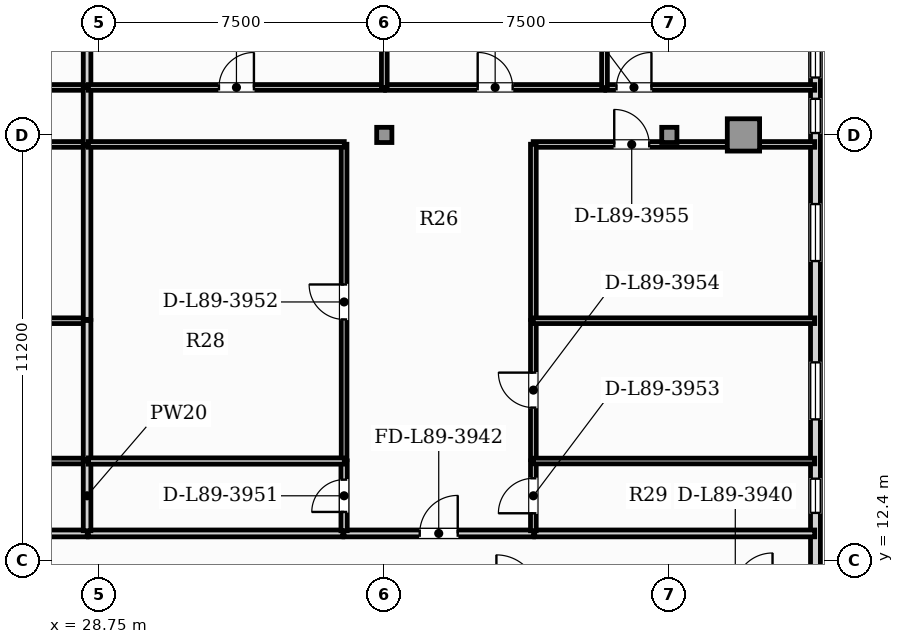
"""IFC4 building model, lengths in metres.
Left out: names, types, materials, properties, quantities, classifications, styles, units other than length and angle.
Written with IfcOpenShell. Run it as: python <this file> out.ifc"""

import sys

from ifc_helpers import new_model, si_unit, direction, frame, frame_2d, origin, origin_2d, place, context, subcontext, project, spatial, rectangle, hollow_rectangle, extrude, element, fill, save


model = new_model("IFC4")
c1 = context("Model", 3, precision=1e-05, world=origin(), true_north=direction((0.0, 1.0)))
c2 = subcontext(c1, "Body", "Model", "MODEL_VIEW")
j1 = project(units=[si_unit("LENGTHUNIT", "METRE"), si_unit("PLANEANGLEUNIT", "RADIAN")], contexts=[c1])
p1 = place(None, origin())
s1 = spatial("IfcSite", under=j1, at=p1, CompositionType="ELEMENT")
p2 = place(p1, origin())
s2 = spatial("IfcBuilding", under=s1, at=p2, CompositionType="ELEMENT")
p3 = place(p2, frame((0.0, 0.0, 362.25)))
s3 = spatial("IfcBuildingStorey", under=s2, at=p3, CompositionType="ELEMENT", Elevation=362.25)
p4 = place(p3, frame((45.7, 23.6, 0.0), z_axis=(0.0, 0.0, 1.0), x_axis=(1.0, 0.0, 0.0)))
e1 = element("IfcColumn", 1, at=p4, inside=s3, PredefinedType="USERDEFINED", context=c2, shape_type="SweptSolid", body=[
    extrude(hollow_rectangle(XDim=0.85, YDim=0.85, WallThickness=0.05, at=origin_2d()), origin(), (0.0, 0.0, 1.0), 4.35),
])
for number, where, z_axis, x_axis in (
    (2, (36.25, 23.6, 0.0), (0.0, 0.0, 1.0), (1.0, 0.0, 0.0)),
    (3, (43.75, 23.6, 0.0), (0.0, 0.0, 1.0), (1.0, 0.0, 0.0)),
):
    element("IfcColumn", number, at=place(p3, frame(where, z_axis=z_axis, x_axis=x_axis)), inside=s3, PredefinedType="COLUMN", context=c2, shape_type="SweptSolid", body=[
        extrude(hollow_rectangle(XDim=0.4, YDim=0.4, WallThickness=0.02, at=origin_2d()), origin(), (0.0, 0.0, 1.0), 4.35),
    ])
p5 = place(p3, frame((47.595, 3.24, 0.0), z_axis=(0.0, 0.0, 1.0), x_axis=(0.0, 1.0, 0.0)))
e4 = element("IfcWall", 4, at=p5, inside=s3, PredefinedType="SOLIDWALL", context=c2, shape_type="SweptSolid", body=[
    extrude(rectangle(XDim=24.14, YDim=0.26, at=frame_2d((12.07, 0.0))), origin(), (0.0, 0.0, 1.0), 4.1),
])
p6 = place(p5, frame((0.77, 0.0, 0.9)))
e5 = element("IfcOpeningElement", 5, at=p6, cuts=e4, PredefinedType="OPENING", context=c2, shape_type="SweptSolid", body=[
    extrude(rectangle(XDim=1.5, YDim=1.95, at=frame_2d((0.75, 0.975))), frame((0.0, 0.14, 0.0), z_axis=(0.0, -1.0, 0.0), x_axis=(1.0, 0.0, 0.0)), (0.0, 0.0, 1.0), 0.28),
])
p7 = place(p5, frame((20.41, 0.0, 0.95)))
e6 = element("IfcOpeningElement", 6, at=p7, cuts=e4, PredefinedType="OPENING", context=c2, shape_type="SweptSolid", body=[
    extrude(rectangle(XDim=0.9, YDim=1.5, at=frame_2d((0.45, 0.75))), frame((0.0, 0.14, 0.0), z_axis=(0.0, -1.0, 0.0), x_axis=(1.0, 0.0, 0.0)), (0.0, 0.0, 1.0), 0.28),
])
p8 = place(p5, frame((10.415, 0.0, 0.95)))
e7 = element("IfcOpeningElement", 7, at=p8, cuts=e4, PredefinedType="OPENING", context=c2, shape_type="SweptSolid", body=[
    extrude(rectangle(XDim=0.9, YDim=1.5, at=frame_2d((0.45, 0.75))), frame((0.0, 0.14, 0.0), z_axis=(0.0, -1.0, 0.0), x_axis=(1.0, 0.0, 0.0)), (0.0, 0.0, 1.0), 0.28),
])
p9 = place(p5, frame((12.876, 0.0, 0.9)))
e8 = element("IfcOpeningElement", 8, at=p9, cuts=e4, PredefinedType="OPENING", context=c2, shape_type="SweptSolid", body=[
    extrude(rectangle(XDim=1.5, YDim=1.95, at=frame_2d((0.75, 0.975))), frame((0.0, 0.14, 0.0), z_axis=(0.0, -1.0, 0.0), x_axis=(1.0, 0.0, 0.0)), (0.0, 0.0, 1.0), 0.28),
])
p10 = place(p5, frame((17.041, 0.0, 0.9)))
e9 = element("IfcOpeningElement", 9, at=p10, cuts=e4, PredefinedType="OPENING", context=c2, shape_type="SweptSolid", body=[
    extrude(rectangle(XDim=1.5, YDim=1.95, at=frame_2d((0.75, 0.975))), frame((0.0, 0.14, 0.0), z_axis=(0.0, -1.0, 0.0), x_axis=(1.0, 0.0, 0.0)), (0.0, 0.0, 1.0), 0.28),
])
p11 = place(p5, frame((21.87, 0.0, 0.9)))
e10 = element("IfcOpeningElement", 10, at=p11, cuts=e4, PredefinedType="OPENING", context=c2, shape_type="SweptSolid", body=[
    extrude(rectangle(XDim=1.5, YDim=1.95, at=frame_2d((0.75, 0.975))), frame((0.0, 0.14, 0.0), z_axis=(0.0, -1.0, 0.0), x_axis=(1.0, 0.0, 0.0)), (0.0, 0.0, 1.0), 0.28),
])
p12 = place(p3, frame((22.096, 13.115, 0.0), z_axis=(0.0, 0.0, 1.0), x_axis=(1.0, 0.0, 0.0)))
e11 = element("IfcWall", 11, at=p12, inside=s3, PredefinedType="PARTITIONING", context=c2, shape_type="SweptSolid", body=[
    extrude(rectangle(XDim=6.339, YDim=0.18, at=frame_2d((3.169, 0.0))), origin(), (0.0, 0.0, 1.0), 4.1),
])
p13 = place(p3, frame((35.187, 13.115, 0.0), z_axis=(0.0, 0.0, 1.0), x_axis=(1.0, 0.0, 0.0)))
e12 = element("IfcWall", 12, at=p13, inside=s3, PredefinedType="PARTITIONING", context=c2, shape_type="SweptSolid", body=[
    extrude(rectangle(XDim=4.99, YDim=0.18, at=frame_2d((2.495, 0.0))), origin(), (0.0, 0.0, 1.0), 4.1),
])
p14 = place(p13, frame((1.995, 0.0, 0.0)))
e13 = element("IfcOpeningElement", 13, at=p14, cuts=e12, PredefinedType="OPENING", context=c2, shape_type="SweptSolid", body=[
    extrude(rectangle(XDim=1.0, YDim=2.15, at=frame_2d((0.5, 1.075))), frame((0.0, 0.1, 0.0), z_axis=(0.0, -1.0, 0.0), x_axis=(1.0, 0.0, 0.0)), (0.0, 0.0, 1.0), 0.2),
])
p15 = place(p3, frame((28.464, 13.115, 0.0), z_axis=(0.0, 0.0, 1.0), x_axis=(1.0, 0.0, 0.0)))
e14 = element("IfcWall", 14, at=p15, inside=s3, PredefinedType="PARTITIONING", context=c2, shape_type="SweptSolid", body=[
    extrude(rectangle(XDim=6.693, YDim=0.18, at=frame_2d((3.346, 0.0))), origin(), (0.0, 0.0, 1.0), 4.1),
])
p16 = place(p3, frame((40.207, 13.115, 0.0), z_axis=(0.0, 0.0, 1.0), x_axis=(1.0, 0.0, 0.0)))
e15 = element("IfcWall", 15, at=p16, inside=s3, PredefinedType="PARTITIONING", context=c2, shape_type="SweptSolid", body=[
    extrude(rectangle(XDim=7.368, YDim=0.18, at=frame_2d((3.684, 0.0))), origin(), (0.0, 0.0, 1.0), 4.1),
])
p17 = place(p3, frame((22.056, 23.35, 0.0), z_axis=(0.0, 0.0, 1.0), x_axis=(1.0, 0.0, 0.0)))
e16 = element("IfcWall", 16, at=p17, inside=s3, PredefinedType="PARTITIONING", context=c2, shape_type="SweptSolid", body=[
    extrude(rectangle(XDim=6.379, YDim=0.15, at=frame_2d((3.189, 0.0))), origin(), (0.0, 0.0, 1.0), 3.2),
])
p18 = place(p17, frame((2.729, 0.0, 0.0)))
e17 = element("IfcOpeningElement", 17, at=p18, cuts=e16, PredefinedType="OPENING", context=c2, shape_type="SweptSolid", body=[
    extrude(rectangle(XDim=0.92, YDim=2.1, at=frame_2d((0.46, 1.05))), frame((0.0, 0.085, 0.0), z_axis=(0.0, -1.0, 0.0), x_axis=(1.0, 0.0, 0.0)), (0.0, 0.0, 1.0), 0.17),
])
p19 = place(p3, frame((23.231, 24.85, 0.0), z_axis=(0.0, 0.0, 1.0), x_axis=(1.0, 0.0, 0.0)))
e18 = element("IfcWall", 18, at=p19, inside=s3, PredefinedType="PARTITIONING", context=c2, shape_type="SweptSolid", body=[
    extrude(rectangle(XDim=5.203, YDim=0.15, at=frame_2d((2.602, 0.0))), origin(), (0.0, 0.0, 1.0), 4.1),
])
p20 = place(p19, frame((2.142, 0.0, 0.0)))
e19 = element("IfcOpeningElement", 19, at=p20, cuts=e18, PredefinedType="OPENING", context=c2, shape_type="SweptSolid", body=[
    extrude(rectangle(XDim=0.92, YDim=2.1, at=frame_2d((0.46, 1.05))), frame((0.0, 0.085, 0.0), z_axis=(0.0, -1.0, 0.0), x_axis=(1.0, 0.0, 0.0)), (0.0, 0.0, 1.0), 0.17),
])
p21 = place(p3, frame((28.429, 23.345, 0.0), z_axis=(0.0, 0.0, 1.0), x_axis=(0.0, 1.0, 0.0)))
e20 = element("IfcWall", 20, at=p21, inside=s3, PredefinedType="PARTITIONING", context=c2, shape_type="SweptSolid", body=[
    extrude(rectangle(XDim=1.51, YDim=0.2, at=frame_2d((0.755, 0.0))), origin(), (0.0, 0.0, 1.0), 4.1),
])
p22 = place(p3, frame((22.056, 15.02, 0.0), z_axis=(0.0, 0.0, 1.0), x_axis=(1.0, 0.0, 0.0)))
e21 = element("IfcWall", 21, at=p22, inside=s3, PredefinedType="PARTITIONING", context=c2, shape_type="SweptSolid", body=[
    extrude(rectangle(XDim=6.379, YDim=0.15, at=frame_2d((3.189, 0.0))), origin(), (0.0, 0.0, 1.0), 4.1),
])
p23 = place(p3, frame((28.429, 13.185, 0.0), z_axis=(0.0, 0.0, 1.0), x_axis=(0.0, 1.0, 0.0)))
e22 = element("IfcWall", 22, at=p23, inside=s3, PredefinedType="PARTITIONING", context=c2, shape_type="SweptSolid", body=[
    extrude(rectangle(XDim=1.84, YDim=0.2, at=frame_2d((0.92, 0.0))), origin(), (0.0, 0.0, 1.0), 4.1),
])
p24 = place(p3, frame((22.056, 18.712, 0.0), z_axis=(0.0, 0.0, 1.0), x_axis=(1.0, 0.0, 0.0)))
e23 = element("IfcWall", 23, at=p24, inside=s3, PredefinedType="PARTITIONING", context=c2, shape_type="SweptSolid", body=[
    extrude(rectangle(XDim=6.379, YDim=0.15, at=frame_2d((3.189, 0.0))), origin(), (0.0, 0.0, 1.0), 4.1),
])
p25 = place(p3, frame((28.429, 15.055, 0.0), z_axis=(0.0, 0.0, 1.0), x_axis=(0.0, 1.0, 0.0)))
e24 = element("IfcWall", 24, at=p25, inside=s3, PredefinedType="PARTITIONING", context=c2, shape_type="SweptSolid", body=[
    extrude(rectangle(XDim=3.662, YDim=0.2, at=frame_2d((1.831, 0.0))), origin(), (0.0, 0.0, 1.0), 4.1),
])
p26 = place(p3, frame((28.429, 18.747, 0.0), z_axis=(0.0, 0.0, 1.0), x_axis=(0.0, 1.0, 0.0)))
e25 = element("IfcWall", 25, at=p26, inside=s3, PredefinedType="PARTITIONING", context=c2, shape_type="SweptSolid", body=[
    extrude(rectangle(XDim=4.568, YDim=0.2, at=frame_2d((2.284, 0.0))), origin(), (0.0, 0.0, 1.0), 4.1),
])
p27 = place(p3, frame((28.429, 24.885, 0.0), z_axis=(0.0, 0.0, 1.0), x_axis=(0.0, 1.0, 0.0)))
e26 = element("IfcWall", 26, at=p27, inside=s3, PredefinedType="PARTITIONING", context=c2, shape_type="SweptSolid", body=[
    extrude(rectangle(XDim=5.587, YDim=0.2, at=frame_2d((2.793, 0.0))), origin(), (0.0, 0.0, 1.0), 4.1),
])
p28 = place(p3, frame((35.192, 13.185, 0.0), z_axis=(0.0, 0.0, 1.0), x_axis=(0.0, 1.0, 0.0)))
e27 = element("IfcWall", 27, at=p28, inside=s3, PredefinedType="PLUMBINGWALL", context=c2, shape_type="SweptSolid", body=[
    extrude(rectangle(XDim=1.84, YDim=0.165, at=frame_2d((0.92, 0.0))), origin(), (0.0, 0.0, 1.0), 4.1),
])
p29 = place(p28, frame((0.495, 0.0, 0.0)))
e28 = element("IfcOpeningElement", 28, at=p29, cuts=e27, PredefinedType="OPENING", context=c2, shape_type="SweptSolid", body=[
    extrude(rectangle(XDim=0.85, YDim=2.1, at=frame_2d((0.425, 1.05))), frame((0.0, 0.093, 0.0), z_axis=(0.0, -1.0, 0.0), x_axis=(1.0, 0.0, 0.0)), (0.0, 0.0, 1.0), 0.185),
])
p30 = place(p3, frame((35.192, 15.055, 0.0), z_axis=(0.0, 0.0, 1.0), x_axis=(0.0, 1.0, 0.0)))
e29 = element("IfcWall", 29, at=p30, inside=s3, PredefinedType="PARTITIONING", context=c2, shape_type="SweptSolid", body=[
    extrude(rectangle(XDim=8.3, YDim=0.15, at=frame_2d((4.15, 0.0))), origin(), (0.0, 0.0, 1.0), 4.1),
])
p31 = place(p30, frame((3.69, 0.0, 0.0)))
e30 = element("IfcOpeningElement", 30, at=p31, cuts=e29, PredefinedType="OPENING", context=c2, shape_type="SweptSolid", body=[
    extrude(rectangle(XDim=0.92, YDim=2.1, at=frame_2d((0.46, 1.05))), frame((0.0, 0.085, 0.0), z_axis=(0.0, -1.0, 0.0), x_axis=(1.0, 0.0, 0.0)), (0.0, 0.0, 1.0), 0.17),
])
p32 = place(p3, frame((28.464, 23.35, 0.0), z_axis=(0.0, 0.0, 1.0), x_axis=(1.0, 0.0, 0.0)))
e31 = element("IfcWall", 31, at=p32, inside=s3, PredefinedType="PARTITIONING", context=c2, shape_type="SweptSolid", body=[
    extrude(rectangle(XDim=6.733, YDim=0.15, at=frame_2d((3.366, 0.0))), origin(), (0.0, 0.0, 1.0), 3.2),
])
p33 = place(p3, frame((40.172, 13.185, 0.0), z_axis=(0.0, 0.0, 1.0), x_axis=(0.0, 1.0, 0.0)))
e32 = element("IfcWall", 32, at=p33, inside=s3, PredefinedType="PARTITIONING", context=c2, shape_type="SweptSolid", body=[
    extrude(rectangle(XDim=1.84, YDim=0.15, at=frame_2d((0.92, 0.0))), origin(), (0.0, 0.0, 1.0), 3.797),
])
p34 = place(p33, frame((0.46, 0.0, 0.0)))
e33 = element("IfcOpeningElement", 33, at=p34, cuts=e32, PredefinedType="OPENING", context=c2, shape_type="SweptSolid", body=[
    extrude(rectangle(XDim=0.92, YDim=2.1, at=frame_2d((0.46, 1.05))), frame((0.0, 0.085, 0.0), z_axis=(0.0, -1.0, 0.0), x_axis=(1.0, 0.0, 0.0)), (0.0, 0.0, 1.0), 0.17),
])
p35 = place(p3, frame((40.172, 15.055, 0.0), z_axis=(0.0, 0.0, 1.0), x_axis=(0.0, 1.0, 0.0)))
e34 = element("IfcWall", 34, at=p35, inside=s3, PredefinedType="PARTITIONING", context=c2, shape_type="SweptSolid", body=[
    extrude(rectangle(XDim=3.662, YDim=0.15, at=frame_2d((1.831, 0.0))), origin(), (0.0, 0.0, 1.0), 3.797),
])
p36 = place(p35, frame((1.371, 0.0, 0.0)))
e35 = element("IfcOpeningElement", 35, at=p36, cuts=e34, PredefinedType="OPENING", context=c2, shape_type="SweptSolid", body=[
    extrude(rectangle(XDim=0.92, YDim=2.1, at=frame_2d((0.46, 1.05))), frame((0.0, 0.085, 0.0), z_axis=(0.0, -1.0, 0.0), x_axis=(1.0, 0.0, 0.0)), (0.0, 0.0, 1.0), 0.17),
])
p37 = place(p3, frame((40.167, 23.35, 0.0), z_axis=(0.0, 0.0, 1.0), x_axis=(1.0, 0.0, 0.0)))
e36 = element("IfcWall", 36, at=p37, inside=s3, PredefinedType="PARTITIONING", context=c2, shape_type="SweptSolid", body=[
    extrude(rectangle(XDim=7.408, YDim=0.15, at=frame_2d((3.704, 0.0))), origin(), (0.0, 0.0, 1.0), 4.1),
])
p38 = place(p37, frame((2.133, 0.0, 0.0)))
e37 = element("IfcOpeningElement", 37, at=p38, cuts=e36, PredefinedType="OPENING", context=c2, shape_type="SweptSolid", body=[
    extrude(rectangle(XDim=0.92, YDim=2.1, at=frame_2d((0.46, 1.05))), frame((0.0, 0.085, 0.0), z_axis=(0.0, -1.0, 0.0), x_axis=(1.0, 0.0, 0.0)), (0.0, 0.0, 1.0), 0.17),
])
p39 = place(p3, frame((40.172, 18.747, 0.0), z_axis=(0.0, 0.0, 1.0), x_axis=(0.0, 1.0, 0.0)))
e38 = element("IfcWall", 38, at=p39, inside=s3, PredefinedType="PARTITIONING", context=c2, shape_type="SweptSolid", body=[
    extrude(rectangle(XDim=4.608, YDim=0.15, at=frame_2d((2.304, 0.0))), origin(), (0.0, 0.0, 1.0), 3.797),
])
p40 = place(p3, frame((28.464, 24.85, 0.0), z_axis=(0.0, 0.0, 1.0), x_axis=(1.0, 0.0, 0.0)))
e39 = element("IfcWall", 39, at=p40, inside=s3, PredefinedType="PARTITIONING", context=c2, shape_type="SweptSolid", body=[
    extrude(rectangle(XDim=7.791, YDim=0.15, at=frame_2d((3.895, 0.0))), origin(), (0.0, 0.0, 1.0), 4.1),
])
p41 = place(p40, frame((3.435, 0.0, 0.0)))
e40 = element("IfcOpeningElement", 40, at=p41, cuts=e39, PredefinedType="OPENING", context=c2, shape_type="SweptSolid", body=[
    extrude(rectangle(XDim=0.92, YDim=2.1, at=frame_2d((0.46, 1.05))), frame((0.0, 0.085, 0.0), z_axis=(0.0, -1.0, 0.0), x_axis=(1.0, 0.0, 0.0)), (0.0, 0.0, 1.0), 0.17),
])
p42 = place(p3, frame((36.285, 24.85, 0.0), z_axis=(0.0, 0.0, 1.0), x_axis=(1.0, 0.0, 0.0)))
e41 = element("IfcWall", 41, at=p42, inside=s3, PredefinedType="PARTITIONING", context=c2, shape_type="SweptSolid", body=[
    extrude(rectangle(XDim=5.764, YDim=0.15, at=frame_2d((2.882, 0.0))), origin(), (0.0, 0.0, 1.0), 4.1),
])
p43 = place(p42, frame((2.422, 0.0, 0.0)))
e42 = element("IfcOpeningElement", 42, at=p43, cuts=e41, PredefinedType="OPENING", context=c2, shape_type="SweptSolid", body=[
    extrude(rectangle(XDim=0.92, YDim=2.1, at=frame_2d((0.46, 1.05))), frame((0.0, 0.085, 0.0), z_axis=(0.0, -1.0, 0.0), x_axis=(1.0, 0.0, 0.0)), (0.0, 0.0, 1.0), 0.17),
])
p44 = place(p3, frame((42.079, 24.85, 0.0), z_axis=(0.0, 0.0, 1.0), x_axis=(1.0, 0.0, 0.0)))
e43 = element("IfcWall", 43, at=p44, inside=s3, PredefinedType="PARTITIONING", context=c2, shape_type="SweptSolid", body=[
    extrude(rectangle(XDim=5.496, YDim=0.15, at=frame_2d((2.748, 0.0))), origin(), (0.0, 0.0, 1.0), 4.1),
])
p45 = place(p44, frame((0.28, 0.0, 0.0)))
e44 = element("IfcOpeningElement", 44, at=p45, cuts=e43, PredefinedType="OPENING", context=c2, shape_type="SweptSolid", body=[
    extrude(rectangle(XDim=0.92, YDim=2.1, at=frame_2d((0.46, 1.05))), frame((0.0, 0.085, 0.0), z_axis=(0.0, -1.0, 0.0), x_axis=(1.0, 0.0, 0.0)), (0.0, 0.0, 1.0), 0.17),
])
p46 = place(p3, frame((28.464, 15.02, 0.0), z_axis=(0.0, 0.0, 1.0), x_axis=(1.0, 0.0, 0.0)))
e45 = element("IfcWall", 45, at=p46, inside=s3, PredefinedType="PLUMBINGWALL", context=c2, shape_type="SweptSolid", body=[
    extrude(rectangle(XDim=6.733, YDim=0.165, at=frame_2d((3.366, 0.0))), origin(), (0.0, 0.0, 1.0), 4.1),
])
for number, where, z_axis, x_axis in (
    (46, (40.167, 15.02, 0.0), (0.0, 0.0, 1.0), (1.0, 0.0, 0.0)),
    (47, (40.167, 18.712, 0.0), (0.0, 0.0, 1.0), (1.0, 0.0, 0.0)),
):
    element("IfcWall", number, at=place(p3, frame(where, z_axis=z_axis, x_axis=x_axis)), inside=s3, PredefinedType="PARTITIONING", context=c2, shape_type="SweptSolid", body=[
        extrude(rectangle(XDim=7.408, YDim=0.15, at=frame_2d((3.704, 0.0))), origin(), (0.0, 0.0, 1.0), 4.1),
    ])
p47 = place(p3, frame((36.25, 24.845, 0.0), z_axis=(0.0, 0.0, 1.0), x_axis=(0.0, 1.0, 0.0)))
e48 = element("IfcWall", 48, at=p47, inside=s3, PredefinedType="PARTITIONING", context=c2, shape_type="SweptSolid", body=[
    extrude(rectangle(XDim=5.625, YDim=0.15, at=frame_2d((2.813, 0.0))), origin(), (0.0, 0.0, 1.0), 3.797),
])
p48 = place(p3, frame((42.044, 24.845, 0.0), z_axis=(0.0, 0.0, 1.0), x_axis=(0.0, 1.0, 0.0)))
e49 = element("IfcWall", 49, at=p48, inside=s3, PredefinedType="PARTITIONING", context=c2, shape_type="SweptSolid", body=[
    extrude(rectangle(XDim=5.625, YDim=0.15, at=frame_2d((2.813, 0.0))), origin(), (0.0, 0.0, 1.0), 4.1),
])
p49 = place(p7, origin())
e50 = element("IfcWindow", 50, at=p49, inside=s3, PartitioningType="SINGLE_PANEL", PredefinedType="WINDOW", context=c2, shape_type="SweptSolid", body=[
    extrude(rectangle(XDim=0.9, YDim=1.5, at=frame_2d((0.45, 0.75))), frame((0.0, 0.03, 0.0), z_axis=(0.0, -1.0, 0.0), x_axis=(1.0, 0.0, 0.0)), (0.0, 0.0, 1.0), 0.06),
])
fill(e6, e50)
p50 = place(p8, origin())
e51 = element("IfcWindow", 51, at=p50, inside=s3, PartitioningType="SINGLE_PANEL", PredefinedType="WINDOW", context=c2, shape_type="SweptSolid", body=[
    extrude(rectangle(XDim=0.9, YDim=1.5, at=frame_2d((0.45, 0.75))), frame((0.0, 0.03, 0.0), z_axis=(0.0, -1.0, 0.0), x_axis=(1.0, 0.0, 0.0)), (0.0, 0.0, 1.0), 0.06),
])
fill(e7, e51)
p51 = place(p9, origin())
e52 = element("IfcWindow", 52, at=p51, inside=s3, PartitioningType="SINGLE_PANEL", PredefinedType="WINDOW", context=c2, shape_type="SweptSolid", body=[
    extrude(rectangle(XDim=1.5, YDim=1.95, at=frame_2d((0.75, 0.975))), frame((0.0, 0.03, 0.0), z_axis=(0.0, -1.0, 0.0), x_axis=(1.0, 0.0, 0.0)), (0.0, 0.0, 1.0), 0.06),
])
fill(e8, e52)
p52 = place(p10, origin())
e53 = element("IfcWindow", 53, at=p52, inside=s3, PartitioningType="SINGLE_PANEL", PredefinedType="WINDOW", context=c2, shape_type="SweptSolid", body=[
    extrude(rectangle(XDim=1.5, YDim=1.95, at=frame_2d((0.75, 0.975))), frame((0.0, 0.03, 0.0), z_axis=(0.0, -1.0, 0.0), x_axis=(1.0, 0.0, 0.0)), (0.0, 0.0, 1.0), 0.06),
])
fill(e9, e53)
p53 = place(p11, origin())
e54 = element("IfcWindow", 54, at=p53, inside=s3, PartitioningType="SINGLE_PANEL", PredefinedType="WINDOW", context=c2, shape_type="SweptSolid", body=[
    extrude(rectangle(XDim=1.5, YDim=1.95, at=frame_2d((0.75, 0.975))), frame((0.0, 0.03, 0.0), z_axis=(0.0, -1.0, 0.0), x_axis=(1.0, 0.0, 0.0)), (0.0, 0.0, 1.0), 0.06),
])
fill(e10, e54)
p54 = place(p14, origin())
e55 = element("IfcDoor", 55, at=p54, inside=s3, OperationType="SINGLE_SWING_RIGHT", PredefinedType="DOOR", context=c2, shape_type="SweptSolid", body=[
    extrude(rectangle(XDim=1.0, YDim=2.15, at=frame_2d((0.5, 1.075))), frame((0.0, 0.025, 0.0), z_axis=(0.0, -1.0, 0.0), x_axis=(1.0, 0.0, 0.0)), (0.0, 0.0, 1.0), 0.05),
])
fill(e13, e55)
p55 = place(p29, origin())
e56 = element("IfcDoor", 56, at=p55, inside=s3, OperationType="SINGLE_SWING_LEFT", PredefinedType="DOOR", context=c2, shape_type="SweptSolid", body=[
    extrude(rectangle(XDim=0.85, YDim=2.1, at=frame_2d((0.425, 1.05))), frame((0.0, 0.025, 0.0), z_axis=(0.0, -1.0, 0.0), x_axis=(1.0, 0.0, 0.0)), (0.0, 0.0, 1.0), 0.05),
])
fill(e28, e56)
p56 = place(p31, origin())
e57 = element("IfcDoor", 57, at=p56, inside=s3, OperationType="SINGLE_SWING_RIGHT", PredefinedType="DOOR", context=c2, shape_type="SweptSolid", body=[
    extrude(rectangle(XDim=0.92, YDim=2.1, at=frame_2d((0.46, 1.05))), frame((0.0, 0.025, 0.0), z_axis=(0.0, -1.0, 0.0), x_axis=(1.0, 0.0, 0.0)), (0.0, 0.0, 1.0), 0.05),
])
fill(e30, e57)
p57 = place(p34, origin())
e58 = element("IfcDoor", 58, at=p57, inside=s3, OperationType="SINGLE_SWING_LEFT", PredefinedType="DOOR", context=c2, shape_type="SweptSolid", body=[
    extrude(rectangle(XDim=0.92, YDim=2.1, at=frame_2d((0.46, 1.05))), frame((0.0, 0.025, 0.0), z_axis=(0.0, -1.0, 0.0), x_axis=(1.0, 0.0, 0.0)), (0.0, 0.0, 1.0), 0.05),
])
fill(e33, e58)
p58 = place(p36, origin())
e59 = element("IfcDoor", 59, at=p58, inside=s3, OperationType="SINGLE_SWING_RIGHT", PredefinedType="DOOR", context=c2, shape_type="SweptSolid", body=[
    extrude(rectangle(XDim=0.92, YDim=2.1, at=frame_2d((0.46, 1.05))), frame((0.0, 0.025, 0.0), z_axis=(0.0, -1.0, 0.0), x_axis=(1.0, 0.0, 0.0)), (0.0, 0.0, 1.0), 0.05),
])
fill(e35, e59)
p59 = place(p38, origin())
e60 = element("IfcDoor", 60, at=p59, inside=s3, OperationType="SINGLE_SWING_LEFT", PredefinedType="DOOR", context=c2, shape_type="SweptSolid", body=[
    extrude(rectangle(XDim=0.92, YDim=2.1, at=frame_2d((0.46, 1.05))), frame((0.0, 0.025, 0.0), z_axis=(0.0, -1.0, 0.0), x_axis=(1.0, 0.0, 0.0)), (0.0, 0.0, 1.0), 0.05),
])
fill(e37, e60)
p60 = place(p41, origin())
e61 = element("IfcDoor", 61, at=p60, inside=s3, OperationType="SINGLE_SWING_RIGHT", PredefinedType="DOOR", context=c2, shape_type="SweptSolid", body=[
    extrude(rectangle(XDim=0.92, YDim=2.1, at=frame_2d((0.46, 1.05))), frame((0.0, 0.025, 0.0), z_axis=(0.0, -1.0, 0.0), x_axis=(1.0, 0.0, 0.0)), (0.0, 0.0, 1.0), 0.05),
])
fill(e40, e61)
p61 = place(p43, origin())
e62 = element("IfcDoor", 62, at=p61, inside=s3, OperationType="SINGLE_SWING_LEFT", PredefinedType="DOOR", context=c2, shape_type="SweptSolid", body=[
    extrude(rectangle(XDim=0.92, YDim=2.1, at=frame_2d((0.46, 1.05))), frame((0.0, 0.025, 0.0), z_axis=(0.0, -1.0, 0.0), x_axis=(1.0, 0.0, 0.0)), (0.0, 0.0, 1.0), 0.05),
])
fill(e42, e62)
p62 = place(p45, origin())
e63 = element("IfcDoor", 63, at=p62, inside=s3, OperationType="SINGLE_SWING_RIGHT", PredefinedType="DOOR", context=c2, shape_type="SweptSolid", body=[
    extrude(rectangle(XDim=0.92, YDim=2.1, at=frame_2d((0.46, 1.05))), frame((0.0, 0.025, 0.0), z_axis=(0.0, -1.0, 0.0), x_axis=(1.0, 0.0, 0.0)), (0.0, 0.0, 1.0), 0.05),
])
fill(e44, e63)
save(model, sys.argv[1])
